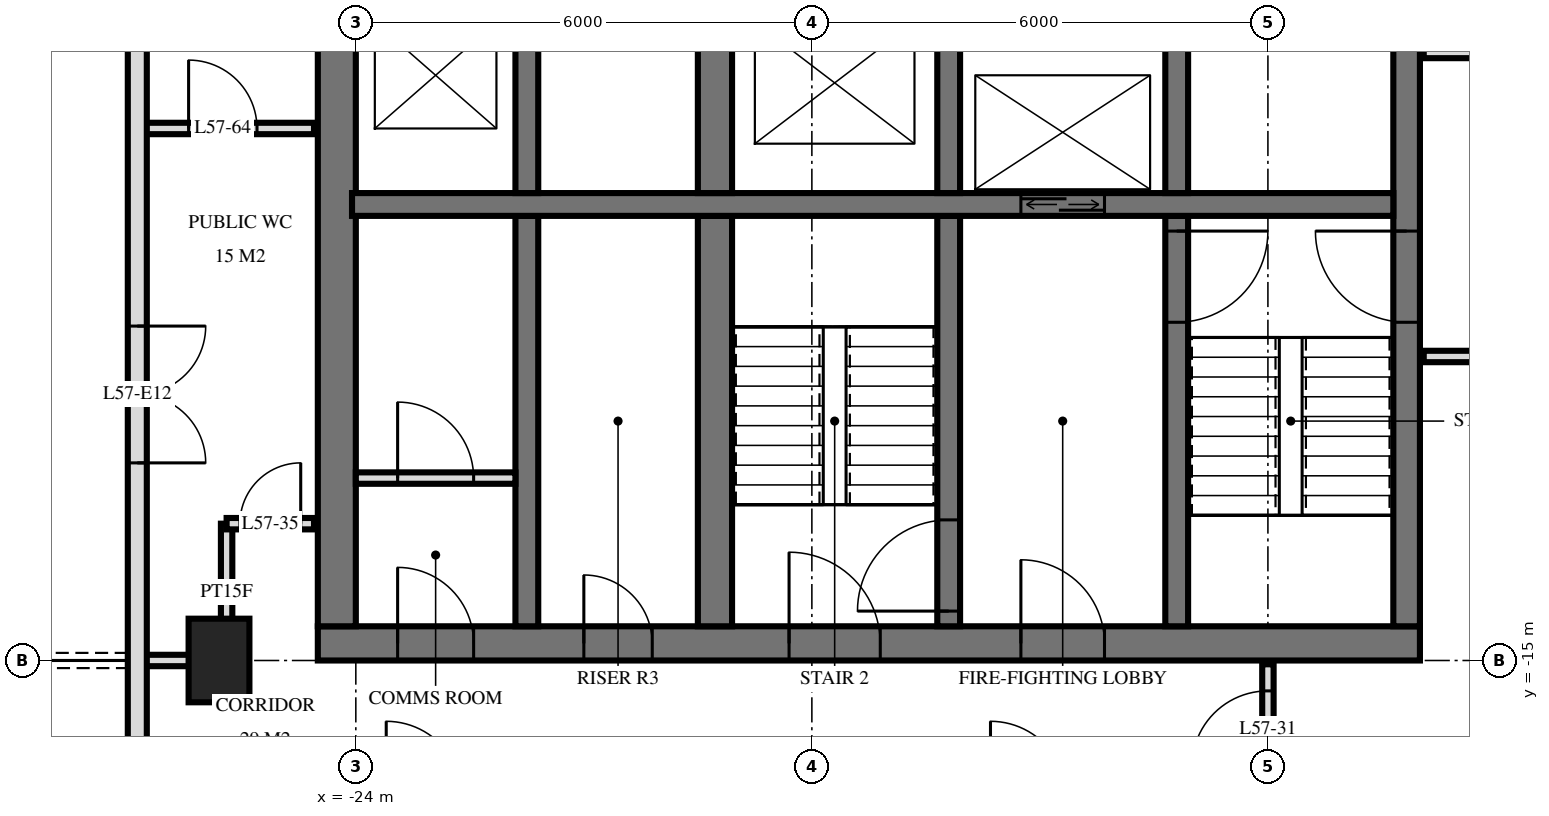
"""IFC4 building model, lengths in metres.
Left out: names, types, materials, properties, quantities, classifications, styles, units other than length and angle.
Written with IfcOpenShell. Run it as: python <this file> out.ifc"""

import sys

from ifc_helpers import new_model, si_unit, direction, frame, frame_2d, origin, origin_2d, place, context, subcontext, project, spatial, rectangle, extrude, element, fill, save


model = new_model("IFC4")
c1 = context("Model", 3, precision=1e-05, world=origin(), true_north=direction((0.0, 1.0)))
c2 = subcontext(c1, "Body", "Model", "MODEL_VIEW")
j1 = project(units=[si_unit("LENGTHUNIT", "METRE"), si_unit("PLANEANGLEUNIT", "RADIAN")], contexts=[c1])
p1 = place(None, origin())
s1 = spatial("IfcSite", under=j1, at=p1, CompositionType="ELEMENT")
p2 = place(p1, origin())
s2 = spatial("IfcBuilding", under=s1, at=p2, CompositionType="ELEMENT")
p3 = place(p2, frame((0.0, 0.0, 218.6)))
s3 = spatial("IfcBuildingStorey", under=s2, at=p3, CompositionType="ELEMENT", Elevation=218.6)
p4 = place(p3, frame((-25.8, -15.0, 0.0), z_axis=(0.0, 0.0, 1.0), x_axis=(0.0, 1.0, 0.0)))
e1 = element("IfcColumn", 1, at=p4, inside=s3, PredefinedType="COLUMN", context=c2, shape_type="SweptSolid", body=[
    extrude(rectangle(XDim=1.1, YDim=0.8, at=origin_2d()), origin(), (0.0, 0.0, 1.0), 3.5),
])
p5 = place(p3, frame((-24.5, -14.775, 0.0), z_axis=(0.0, 0.0, 1.0), x_axis=(1.0, 0.0, 0.0)))
e2 = element("IfcWall", 2, at=p5, inside=s3, PredefinedType="SHEAR", context=c2, shape_type="SweptSolid", body=[
    extrude(rectangle(XDim=14.5, YDim=0.45, at=frame_2d((7.25, 0.0))), origin(), (0.0, 0.0, 1.0), 3.5),
])
p6 = place(p5, frame((6.2, 0.0, 0.0)))
e3 = element("IfcOpeningElement", 3, at=p6, cuts=e2, PredefinedType="OPENING", context=c2, shape_type="SweptSolid", body=[
    extrude(rectangle(XDim=1.2, YDim=2.1, at=frame_2d((0.6, 1.05))), frame((0.0, 0.235, 0.0), z_axis=(0.0, -1.0, 0.0), x_axis=(1.0, 0.0, 0.0)), (0.0, 0.0, 1.0), 0.47),
])
p7 = place(p5, frame((9.25, 0.0, 0.0)))
e4 = element("IfcOpeningElement", 4, at=p7, cuts=e2, PredefinedType="OPENING", context=c2, shape_type="SweptSolid", body=[
    extrude(rectangle(XDim=1.1, YDim=2.1, at=frame_2d((0.55, 1.05))), frame((0.0, 0.235, 0.0), z_axis=(0.0, -1.0, 0.0), x_axis=(1.0, 0.0, 0.0)), (0.0, 0.0, 1.0), 0.47),
])
p8 = place(p5, frame((3.5, 0.0, 0.0)))
e5 = element("IfcOpeningElement", 5, at=p8, cuts=e2, PredefinedType="OPENING", context=c2, shape_type="SweptSolid", body=[
    extrude(rectangle(XDim=0.9, YDim=2.1, at=frame_2d((0.45, 1.05))), frame((0.0, 0.235, 0.0), z_axis=(0.0, -1.0, 0.0), x_axis=(1.0, 0.0, 0.0)), (0.0, 0.0, 1.0), 0.47),
])
p9 = place(p5, frame((1.05, 0.0, 0.0)))
e6 = element("IfcOpeningElement", 6, at=p9, cuts=e2, PredefinedType="OPENING", context=c2, shape_type="SweptSolid", body=[
    extrude(rectangle(XDim=1.0, YDim=2.1, at=frame_2d((0.5, 1.05))), frame((0.0, 0.235, 0.0), z_axis=(0.0, -1.0, 0.0), x_axis=(1.0, 0.0, 0.0)), (0.0, 0.0, 1.0), 0.47),
])
p10 = place(p3, frame((-10.175, -14.55, 0.0), z_axis=(0.0, 0.0, 1.0), x_axis=(0.0, 1.0, 0.0)))
e7 = element("IfcWall", 7, at=p10, inside=s3, PredefinedType="SHEAR", context=c2, shape_type="SweptSolid", body=[
    extrude(rectangle(XDim=14.1, YDim=0.35, at=frame_2d((7.05, 0.0))), origin(), (0.0, 0.0, 1.0), 3.5),
])
p11 = place(p10, frame((8.4, 0.0, 0.0)))
e8 = element("IfcOpeningElement", 8, at=p11, cuts=e7, PredefinedType="OPENING", context=c2, shape_type="SweptSolid", body=[
    extrude(rectangle(XDim=1.4, YDim=2.4, at=frame_2d((0.7, 1.2))), frame((0.0, 0.185, 0.0), z_axis=(0.0, -1.0, 0.0), x_axis=(1.0, 0.0, 0.0)), (0.0, 0.0, 1.0), 0.37),
])
p12 = place(p10, frame((10.0, 0.0, 0.0)))
e9 = element("IfcOpeningElement", 9, at=p12, cuts=e7, PredefinedType="OPENING", context=c2, shape_type="SweptSolid", body=[
    extrude(rectangle(XDim=1.4, YDim=2.4, at=frame_2d((0.7, 1.2))), frame((0.0, 0.185, 0.0), z_axis=(0.0, -1.0, 0.0), x_axis=(1.0, 0.0, 0.0)), (0.0, 0.0, 1.0), 0.37),
])
p13 = place(p10, frame((4.0, 0.0, 0.0)))
e10 = element("IfcOpeningElement", 10, at=p13, cuts=e7, PredefinedType="OPENING", context=c2, shape_type="SweptSolid", body=[
    extrude(rectangle(XDim=1.2, YDim=2.1, at=frame_2d((0.6, 1.05))), frame((0.0, 0.185, 0.0), z_axis=(0.0, -1.0, 0.0), x_axis=(1.0, 0.0, 0.0)), (0.0, 0.0, 1.0), 0.37),
])
p14 = place(p3, frame((-24.25, -14.55, 0.0), z_axis=(0.0, 0.0, 1.0), x_axis=(0.0, 1.0, 0.0)))
e11 = element("IfcWall", 11, at=p14, inside=s3, PredefinedType="SHEAR", context=c2, shape_type="SweptSolid", body=[
    extrude(rectangle(XDim=14.1, YDim=0.5, at=frame_2d((7.05, 0.0))), origin(), (0.0, 0.0, 1.0), 3.5),
])
p15 = place(p3, frame((-24.05, -9.0, 0.0), z_axis=(0.0, 0.0, 1.0), x_axis=(1.0, 0.0, 0.0)))
e12 = element("IfcWall", 12, at=p15, inside=s3, PredefinedType="SHEAR", context=c2, shape_type="SweptSolid", body=[
    extrude(rectangle(XDim=13.7, YDim=0.3, at=frame_2d((6.85, 0.0))), origin(), (0.0, 0.0, 1.0), 3.5),
])
p16 = place(p15, frame((8.8, 0.0, 0.0)))
e13 = element("IfcOpeningElement", 13, at=p16, cuts=e12, PredefinedType="OPENING", context=c2, shape_type="SweptSolid", body=[
    extrude(rectangle(XDim=1.1, YDim=2.1, at=frame_2d((0.55, 1.05))), frame((0.0, 0.16, 0.0), z_axis=(0.0, -1.0, 0.0), x_axis=(1.0, 0.0, 0.0)), (0.0, 0.0, 1.0), 0.32),
])
p17 = place(p3, frame((-13.2, -8.85, 0.0), z_axis=(0.0, 0.0, 1.0), x_axis=(0.0, 1.0, 0.0)))
e14 = element("IfcWall", 14, at=p17, inside=s3, PredefinedType="SHEAR", context=c2, shape_type="SweptSolid", body=[
    extrude(rectangle(XDim=2.3, YDim=0.3, at=frame_2d((1.15, 0.0))), origin(), (0.0, 0.0, 1.0), 3.5),
])
p18 = place(p3, frame((-13.2, -14.55, 0.0), z_axis=(0.0, 0.0, 1.0), x_axis=(0.0, 1.0, 0.0)))
e15 = element("IfcWall", 15, at=p18, inside=s3, PredefinedType="SHEAR", context=c2, shape_type="SweptSolid", body=[
    extrude(rectangle(XDim=5.4, YDim=0.3, at=frame_2d((2.7, 0.0))), origin(), (0.0, 0.0, 1.0), 3.5),
])
p19 = place(p18, frame((4.0, 0.0, 0.0)))
e16 = element("IfcOpeningElement", 16, at=p19, cuts=e15, PredefinedType="OPENING", context=c2, shape_type="SweptSolid", body=[
    extrude(rectangle(XDim=1.2, YDim=2.1, at=frame_2d((0.6, 1.05))), frame((0.0, 0.16, 0.0), z_axis=(0.0, -1.0, 0.0), x_axis=(1.0, 0.0, 0.0)), (0.0, 0.0, 1.0), 0.32),
])
p20 = place(p3, frame((-16.2, -8.85, 0.0), z_axis=(0.0, 0.0, 1.0), x_axis=(0.0, 1.0, 0.0)))
e17 = element("IfcWall", 17, at=p20, inside=s3, PredefinedType="SHEAR", context=c2, shape_type="SweptSolid", body=[
    extrude(rectangle(XDim=2.3, YDim=0.3, at=frame_2d((1.15, 0.0))), origin(), (0.0, 0.0, 1.0), 3.5),
])
p21 = place(p3, frame((-16.2, -14.55, 0.0), z_axis=(0.0, 0.0, 1.0), x_axis=(0.0, 1.0, 0.0)))
e18 = element("IfcWall", 18, at=p21, inside=s3, PredefinedType="SHEAR", context=c2, shape_type="SweptSolid", body=[
    extrude(rectangle(XDim=5.4, YDim=0.3, at=frame_2d((2.7, 0.0))), origin(), (0.0, 0.0, 1.0), 3.5),
])
p22 = place(p21, frame((0.2, 0.0, 0.0)))
e19 = element("IfcOpeningElement", 19, at=p22, cuts=e18, PredefinedType="OPENING", context=c2, shape_type="SweptSolid", body=[
    extrude(rectangle(XDim=1.2, YDim=2.1, at=frame_2d((0.6, 1.05))), frame((0.0, 0.16, 0.0), z_axis=(0.0, -1.0, 0.0), x_axis=(1.0, 0.0, 0.0)), (0.0, 0.0, 1.0), 0.32),
])
p23 = place(p3, frame((-19.275, -8.85, 0.0), z_axis=(0.0, 0.0, 1.0), x_axis=(0.0, 1.0, 0.0)))
e20 = element("IfcWall", 20, at=p23, inside=s3, PredefinedType="SHEAR", context=c2, shape_type="SweptSolid", body=[
    extrude(rectangle(XDim=2.3, YDim=0.45, at=frame_2d((1.15, 0.0))), origin(), (0.0, 0.0, 1.0), 3.5),
])
p24 = place(p3, frame((-19.275, -14.55, 0.0), z_axis=(0.0, 0.0, 1.0), x_axis=(0.0, 1.0, 0.0)))
e21 = element("IfcWall", 21, at=p24, inside=s3, PredefinedType="SHEAR", context=c2, shape_type="SweptSolid", body=[
    extrude(rectangle(XDim=5.4, YDim=0.45, at=frame_2d((2.7, 0.0))), origin(), (0.0, 0.0, 1.0), 3.5),
])
p25 = place(p3, frame((-21.75, -8.85, 0.0), z_axis=(0.0, 0.0, 1.0), x_axis=(0.0, 1.0, 0.0)))
e22 = element("IfcWall", 22, at=p25, inside=s3, PredefinedType="SHEAR", context=c2, shape_type="SweptSolid", body=[
    extrude(rectangle(XDim=2.3, YDim=0.3, at=frame_2d((1.15, 0.0))), origin(), (0.0, 0.0, 1.0), 3.5),
])
p26 = place(p3, frame((-21.75, -14.55, 0.0), z_axis=(0.0, 0.0, 1.0), x_axis=(0.0, 1.0, 0.0)))
e23 = element("IfcWall", 23, at=p26, inside=s3, PredefinedType="SHEAR", context=c2, shape_type="SweptSolid", body=[
    extrude(rectangle(XDim=5.4, YDim=0.3, at=frame_2d((2.7, 0.0))), origin(), (0.0, 0.0, 1.0), 3.5),
])
p27 = place(p3, frame((-26.875, -3.325, 0.0), z_axis=(0.0, 0.0, 1.0), x_axis=(0.0, -1.0, 0.0)))
e24 = element("IfcWall", 24, at=p27, inside=s3, PredefinedType="SOLIDWALL", context=c2, shape_type="SweptSolid", body=[
    extrude(rectangle(XDim=21.551, YDim=0.25, at=frame_2d((10.775, 0.0))), origin(), (0.0, 0.0, 1.0), 3.22),
])
p28 = place(p27, frame((7.275, 0.0, 0.0)))
e25 = element("IfcOpeningElement", 25, at=p28, cuts=e24, PredefinedType="OPENING", context=c2, shape_type="SweptSolid", body=[
    extrude(rectangle(XDim=1.8, YDim=2.4, at=frame_2d((0.9, 1.2))), frame((0.0, 0.135, 0.0), z_axis=(0.0, -1.0, 0.0), x_axis=(1.0, 0.0, 0.0)), (0.0, 0.0, 1.0), 0.27),
])
p29 = place(p27, frame((15.275, 0.0, 0.0)))
e26 = element("IfcOpeningElement", 26, at=p29, cuts=e24, PredefinedType="OPENING", context=c2, shape_type="SweptSolid", body=[
    extrude(rectangle(XDim=1.8, YDim=2.4, at=frame_2d((0.9, 1.2))), frame((0.0, 0.135, 0.0), z_axis=(0.0, -1.0, 0.0), x_axis=(1.0, 0.0, 0.0)), (0.0, 0.0, 1.0), 0.27),
])
p30 = place(p27, frame((18.875, 0.0, 0.0)))
e27 = element("IfcOpeningElement", 27, at=p30, cuts=e24, PredefinedType="OPENING", context=c2, shape_type="SweptSolid", body=[
    extrude(rectangle(XDim=1.8, YDim=2.4, at=frame_2d((0.9, 1.2))), frame((0.0, 0.135, 0.0), z_axis=(0.0, -1.0, 0.0), x_axis=(1.0, 0.0, 0.0)), (0.0, 0.0, 1.0), 0.27),
])
p31 = place(p3, frame((-24.0, -12.6, 0.0), z_axis=(0.0, 0.0, 1.0), x_axis=(1.0, 0.0, 0.0)))
e28 = element("IfcWall", 28, at=p31, inside=s3, PredefinedType="PARTITIONING", context=c2, shape_type="SweptSolid", body=[
    extrude(rectangle(XDim=2.1, YDim=0.15, at=frame_2d((1.05, 0.0))), origin(), (0.0, 0.0, 1.0), 3.2),
])
p32 = place(p31, frame((0.55, 0.0, 0.0)))
e29 = element("IfcOpeningElement", 29, at=p32, cuts=e28, PredefinedType="OPENING", context=c2, shape_type="SweptSolid", body=[
    extrude(rectangle(XDim=1.0, YDim=2.1, at=frame_2d((0.5, 1.05))), frame((0.0, 0.085, 0.0), z_axis=(0.0, -1.0, 0.0), x_axis=(1.0, 0.0, 0.0)), (0.0, 0.0, 1.0), 0.17),
])
p33 = place(p3, frame((-12.0, -16.8, 0.0), z_axis=(0.0, 0.0, 1.0), x_axis=(0.0, 1.0, 0.0)))
e30 = element("IfcWall", 30, at=p33, inside=s3, PredefinedType="PARTITIONING", context=c2, shape_type="SweptSolid", body=[
    extrude(rectangle(XDim=1.75, YDim=0.15, at=frame_2d((0.875, 0.0))), origin(), (0.0, 0.0, 1.0), 3.22),
])
p34 = place(p33, frame((0.4, 0.0, 0.0)))
e31 = element("IfcOpeningElement", 31, at=p34, cuts=e30, PredefinedType="OPENING", context=c2, shape_type="SweptSolid", body=[
    extrude(rectangle(XDim=1.0, YDim=2.1, at=frame_2d((0.5, 1.05))), frame((0.0, 0.085, 0.0), z_axis=(0.0, -1.0, 0.0), x_axis=(1.0, 0.0, 0.0)), (0.0, 0.0, 1.0), 0.17),
])
p35 = place(p3, frame((-25.7, -15.0, 0.0), z_axis=(0.0, 0.0, 1.0), x_axis=(0.0, 1.0, 0.0)))
e32 = element("IfcWall", 32, at=p35, inside=s3, PredefinedType="PARTITIONING", context=c2, shape_type="SweptSolid", body=[
    extrude(rectangle(XDim=1.8, YDim=0.15, at=frame_2d((0.9, 0.0))), origin(), (0.0, 0.0, 1.0), 3.22),
])
p36 = place(p3, frame((-26.82, -15.0, 0.0), z_axis=(0.0, 0.0, 1.0), x_axis=(1.0, 0.0, 0.0)))
e33 = element("IfcWall", 33, at=p36, inside=s3, PredefinedType="PARTITIONING", context=c2, shape_type="SweptSolid", body=[
    extrude(rectangle(XDim=1.12, YDim=0.15, at=frame_2d((0.56, 0.0))), origin(), (0.0, 0.0, 1.0), 3.22),
])
p37 = place(p3, frame((-25.7, -13.2, 0.0), z_axis=(0.0, 0.0, 1.0), x_axis=(1.0, 0.0, 0.0)))
e34 = element("IfcWall", 34, at=p37, inside=s3, PredefinedType="PARTITIONING", context=c2, shape_type="SweptSolid", body=[
    extrude(rectangle(XDim=1.15, YDim=0.15, at=frame_2d((0.575, 0.0))), origin(), (0.0, 0.0, 1.0), 3.22),
])
p38 = place(p37, frame((0.175, 0.0, 0.0)))
e35 = element("IfcOpeningElement", 35, at=p38, cuts=e34, PredefinedType="OPENING", context=c2, shape_type="SweptSolid", body=[
    extrude(rectangle(XDim=0.8, YDim=2.1, at=frame_2d((0.4, 1.05))), frame((0.0, 0.085, 0.0), z_axis=(0.0, -1.0, 0.0), x_axis=(1.0, 0.0, 0.0)), (0.0, 0.0, 1.0), 0.17),
])
p39 = place(p3, frame((-9.95, -11.0, 0.0), z_axis=(0.0, 0.0, 1.0), x_axis=(1.0, 0.0, 0.0)))
e36 = element("IfcWall", 36, at=p39, inside=s3, PredefinedType="PARTITIONING", context=c2, shape_type="SweptSolid", body=[
    extrude(rectangle(XDim=19.9, YDim=0.15, at=frame_2d((9.95, 0.0))), origin(), (0.0, 0.0, 1.0), 3.22),
])
p40 = place(p39, frame((9.45, 0.0, 0.0)))
e37 = element("IfcOpeningElement", 37, at=p40, cuts=e36, PredefinedType="OPENING", context=c2, shape_type="SweptSolid", body=[
    extrude(rectangle(XDim=1.0, YDim=2.1, at=frame_2d((0.5, 1.05))), frame((0.0, 0.085, 0.0), z_axis=(0.0, -1.0, 0.0), x_axis=(1.0, 0.0, 0.0)), (0.0, 0.0, 1.0), 0.17),
])
p41 = place(p39, frame((3.45, 0.0, 0.0)))
e38 = element("IfcOpeningElement", 38, at=p41, cuts=e36, PredefinedType="OPENING", context=c2, shape_type="SweptSolid", body=[
    extrude(rectangle(XDim=1.0, YDim=2.1, at=frame_2d((0.5, 1.05))), frame((0.0, 0.085, 0.0), z_axis=(0.0, -1.0, 0.0), x_axis=(1.0, 0.0, 0.0)), (0.0, 0.0, 1.0), 0.17),
])
p42 = place(p3, frame((-26.82, -8.0, 0.0), z_axis=(0.0, 0.0, 1.0), x_axis=(1.0, 0.0, 0.0)))
e39 = element("IfcWall", 39, at=p42, inside=s3, PredefinedType="PLUMBINGWALL", context=c2, shape_type="SweptSolid", body=[
    extrude(rectangle(XDim=2.27, YDim=0.15, at=frame_2d((1.135, 0.0))), origin(), (0.0, 0.0, 1.0), 3.22),
])
p43 = place(p42, frame((0.62, 0.0, 0.0)))
e40 = element("IfcOpeningElement", 40, at=p43, cuts=e39, PredefinedType="OPENING", context=c2, shape_type="SweptSolid", body=[
    extrude(rectangle(XDim=0.9, YDim=2.1, at=frame_2d((0.45, 1.05))), frame((0.0, 0.085, 0.0), z_axis=(0.0, -1.0, 0.0), x_axis=(1.0, 0.0, 0.0)), (0.0, 0.0, 1.0), 0.17),
])
p44 = place(p3, frame((-9.95, -7.0, 0.0), z_axis=(0.0, 0.0, 1.0), x_axis=(1.0, 0.0, 0.0)))
e41 = element("IfcWall", 41, at=p44, inside=s3, PredefinedType="PARTITIONING", context=c2, shape_type="SweptSolid", body=[
    extrude(rectangle(XDim=19.9, YDim=0.15, at=frame_2d((9.95, 0.0))), origin(), (0.0, 0.0, 1.0), 3.22),
])
p45 = place(p44, frame((9.45, 0.0, 0.0)))
e42 = element("IfcOpeningElement", 42, at=p45, cuts=e41, PredefinedType="OPENING", context=c2, shape_type="SweptSolid", body=[
    extrude(rectangle(XDim=1.0, YDim=2.1, at=frame_2d((0.5, 1.05))), frame((0.0, 0.085, 0.0), z_axis=(0.0, -1.0, 0.0), x_axis=(1.0, 0.0, 0.0)), (0.0, 0.0, 1.0), 0.17),
])
p46 = place(p44, frame((15.45, 0.0, 0.0)))
e43 = element("IfcOpeningElement", 43, at=p46, cuts=e41, PredefinedType="OPENING", context=c2, shape_type="SweptSolid", body=[
    extrude(rectangle(XDim=1.0, YDim=2.1, at=frame_2d((0.5, 1.05))), frame((0.0, 0.085, 0.0), z_axis=(0.0, -1.0, 0.0), x_axis=(1.0, 0.0, 0.0)), (0.0, 0.0, 1.0), 0.17),
])
p47 = place(p28, origin())
e44 = element("IfcDoor", 44, at=p47, inside=s3, OperationType="DOUBLE_DOOR_SINGLE_SWING", PredefinedType="DOOR", context=c2, shape_type="SweptSolid", body=[
    extrude(rectangle(XDim=1.8, YDim=2.4, at=frame_2d((0.9, 1.2))), frame((0.0, 0.025, 0.0), z_axis=(0.0, -1.0, 0.0), x_axis=(1.0, 0.0, 0.0)), (0.0, 0.0, 1.0), 0.05),
])
fill(e25, e44)
p48 = place(p16, origin())
e45 = element("IfcDoor", 45, at=p48, inside=s3, OperationType="DOUBLE_DOOR_SLIDING", PredefinedType="USERDEFINED", context=c2, shape_type="SweptSolid", body=[
    extrude(rectangle(XDim=1.1, YDim=2.1, at=frame_2d((0.55, 1.05))), frame((0.0, 0.025, 0.0), z_axis=(0.0, -1.0, 0.0), x_axis=(1.0, 0.0, 0.0)), (0.0, 0.0, 1.0), 0.05),
])
fill(e13, e45)
p49 = place(p13, origin())
e46 = element("IfcDoor", 46, at=p49, inside=s3, OperationType="SINGLE_SWING_LEFT", PredefinedType="DOOR", context=c2, shape_type="SweptSolid", body=[
    extrude(rectangle(XDim=1.2, YDim=2.1, at=frame_2d((0.6, 1.05))), frame((0.0, 0.025, 0.0), z_axis=(0.0, -1.0, 0.0), x_axis=(1.0, 0.0, 0.0)), (0.0, 0.0, 1.0), 0.05),
])
fill(e10, e46)
p50 = place(p6, origin())
e47 = element("IfcDoor", 47, at=p50, inside=s3, OperationType="SINGLE_SWING_RIGHT", PredefinedType="DOOR", context=c2, shape_type="SweptSolid", body=[
    extrude(rectangle(XDim=1.2, YDim=2.1, at=frame_2d((0.6, 1.05))), frame((0.0, 0.025, 0.0), z_axis=(0.0, -1.0, 0.0), x_axis=(1.0, 0.0, 0.0)), (0.0, 0.0, 1.0), 0.05),
])
fill(e3, e47)
p51 = place(p7, origin())
e48 = element("IfcDoor", 48, at=p51, inside=s3, OperationType="SINGLE_SWING_RIGHT", PredefinedType="DOOR", context=c2, shape_type="SweptSolid", body=[
    extrude(rectangle(XDim=1.1, YDim=2.1, at=frame_2d((0.55, 1.05))), frame((0.0, 0.025, 0.0), z_axis=(0.0, -1.0, 0.0), x_axis=(1.0, 0.0, 0.0)), (0.0, 0.0, 1.0), 0.05),
])
fill(e4, e48)
p52 = place(p8, origin())
e49 = element("IfcDoor", 49, at=p52, inside=s3, OperationType="SINGLE_SWING_RIGHT", PredefinedType="DOOR", context=c2, shape_type="SweptSolid", body=[
    extrude(rectangle(XDim=0.9, YDim=2.1, at=frame_2d((0.45, 1.05))), frame((0.0, 0.025, 0.0), z_axis=(0.0, -1.0, 0.0), x_axis=(1.0, 0.0, 0.0)), (0.0, 0.0, 1.0), 0.05),
])
fill(e5, e49)
p53 = place(p9, origin())
e50 = element("IfcDoor", 50, at=p53, inside=s3, OperationType="SINGLE_SWING_RIGHT", PredefinedType="DOOR", context=c2, shape_type="SweptSolid", body=[
    extrude(rectangle(XDim=1.0, YDim=2.1, at=frame_2d((0.5, 1.05))), frame((0.0, 0.025, 0.0), z_axis=(0.0, -1.0, 0.0), x_axis=(1.0, 0.0, 0.0)), (0.0, 0.0, 1.0), 0.05),
])
fill(e6, e50)
p54 = place(p19, frame((0.6, 0.0, 0.0), z_axis=(0.0, 0.0, 1.0), x_axis=(-1.0, 0.0, 0.0)))
e51 = element("IfcDoor", 51, at=p54, inside=s3, OperationType="SINGLE_SWING_RIGHT", PredefinedType="DOOR", context=c2, shape_type="SweptSolid", body=[
    extrude(rectangle(XDim=1.2, YDim=2.1, at=frame_2d((0.0, 1.05))), frame((0.0, -0.025, 0.0), z_axis=(0.0, 1.0, 0.0), x_axis=(-1.0, 0.0, 0.0)), (0.0, 0.0, 1.0), 0.05),
])
fill(e16, e51)
p55 = place(p22, origin())
e52 = element("IfcDoor", 52, at=p55, inside=s3, OperationType="SINGLE_SWING_RIGHT", PredefinedType="DOOR", context=c2, shape_type="SweptSolid", body=[
    extrude(rectangle(XDim=1.2, YDim=2.1, at=frame_2d((0.6, 1.05))), frame((0.0, 0.025, 0.0), z_axis=(0.0, -1.0, 0.0), x_axis=(1.0, 0.0, 0.0)), (0.0, 0.0, 1.0), 0.05),
])
fill(e19, e52)
p56 = place(p32, origin())
e53 = element("IfcDoor", 53, at=p56, inside=s3, OperationType="SINGLE_SWING_RIGHT", PredefinedType="DOOR", context=c2, shape_type="SweptSolid", body=[
    extrude(rectangle(XDim=1.0, YDim=2.1, at=frame_2d((0.5, 1.05))), frame((0.0, 0.025, 0.0), z_axis=(0.0, -1.0, 0.0), x_axis=(1.0, 0.0, 0.0)), (0.0, 0.0, 1.0), 0.05),
])
fill(e29, e53)
p57 = place(p34, origin())
e54 = element("IfcDoor", 54, at=p57, inside=s3, OperationType="SINGLE_SWING_RIGHT", PredefinedType="DOOR", context=c2, shape_type="SweptSolid", body=[
    extrude(rectangle(XDim=1.0, YDim=2.1, at=frame_2d((0.5, 1.05))), frame((0.0, 0.025, 0.0), z_axis=(0.0, -1.0, 0.0), x_axis=(1.0, 0.0, 0.0)), (0.0, 0.0, 1.0), 0.05),
])
fill(e31, e54)
p58 = place(p38, origin())
e55 = element("IfcDoor", 55, at=p58, inside=s3, OperationType="SINGLE_SWING_LEFT", PredefinedType="DOOR", context=c2, shape_type="SweptSolid", body=[
    extrude(rectangle(XDim=0.8, YDim=2.1, at=frame_2d((0.4, 1.05))), frame((0.0, 0.025, 0.0), z_axis=(0.0, -1.0, 0.0), x_axis=(1.0, 0.0, 0.0)), (0.0, 0.0, 1.0), 0.05),
])
fill(e35, e55)
p59 = place(p43, origin())
e56 = element("IfcDoor", 56, at=p59, inside=s3, OperationType="SINGLE_SWING_RIGHT", PredefinedType="DOOR", context=c2, shape_type="SweptSolid", body=[
    extrude(rectangle(XDim=0.9, YDim=2.1, at=frame_2d((0.45, 1.05))), frame((0.0, 0.025, 0.0), z_axis=(0.0, -1.0, 0.0), x_axis=(1.0, 0.0, 0.0)), (0.0, 0.0, 1.0), 0.05),
])
fill(e40, e56)
save(model, sys.argv[1])
